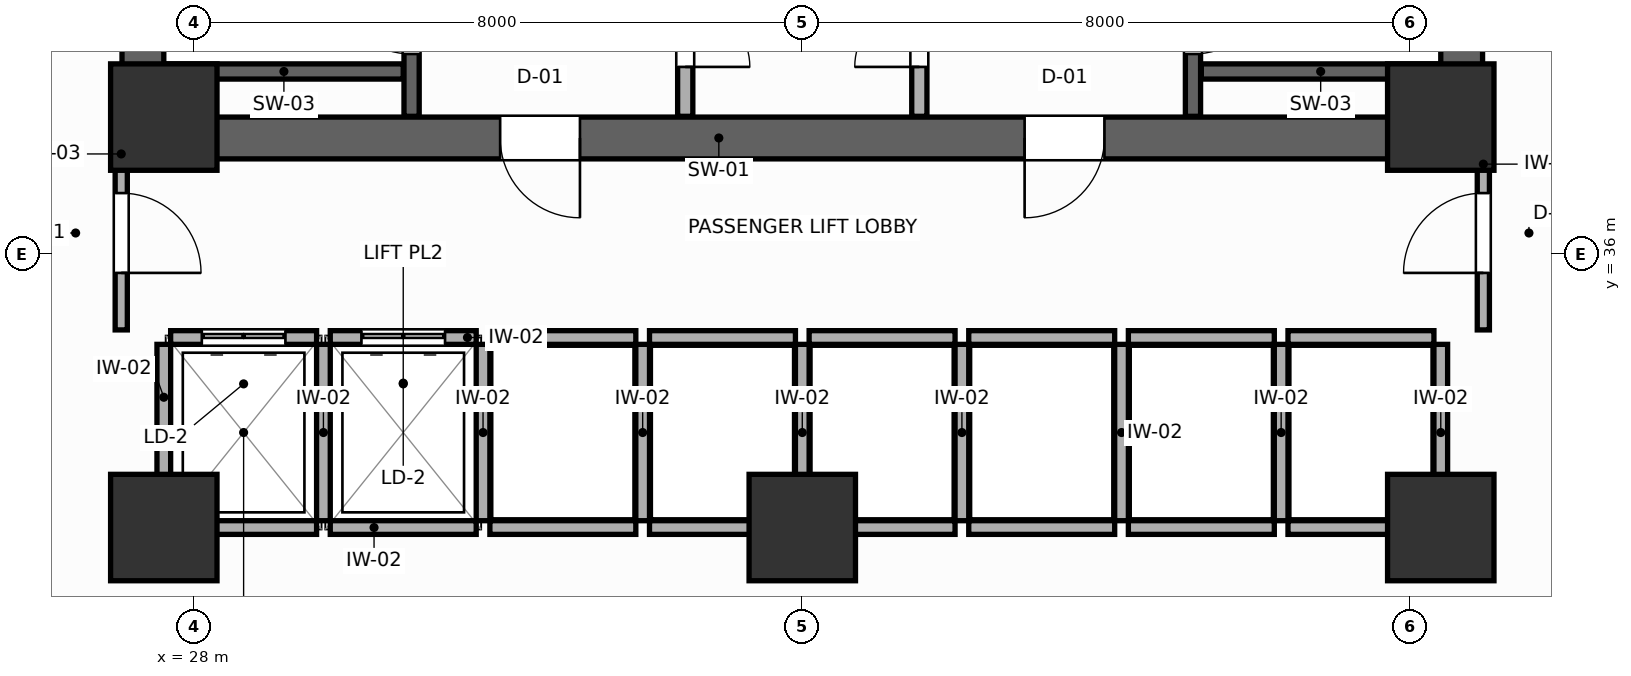
"""IFC4 building model, lengths in metres.
Left out: names, types, materials, properties, quantities, classifications, styles, units other than length and angle.
Written with IfcOpenShell. Run it as: python <this file> out.ifc"""

import sys

from ifc_helpers import new_model, si_unit, direction, frame, frame_2d, origin, origin_2d, place, context, subcontext, project, spatial, rectangle, extrude, source, transform, mapped, element, fill, save


model = new_model("IFC4")
c1 = context("Model", 3, precision=1e-05, world=origin(), true_north=direction((0.0, 1.0)))
c2 = subcontext(c1, "Body", "Model", "MODEL_VIEW")
j1 = project(units=[si_unit("LENGTHUNIT", "METRE"), si_unit("PLANEANGLEUNIT", "RADIAN")], contexts=[c1])
p1 = place(None, origin())
s1 = spatial("IfcSite", under=j1, at=p1, CompositionType="ELEMENT")
p2 = place(p1, origin())
s2 = spatial("IfcBuilding", under=s1, at=p2, CompositionType="ELEMENT")
p3 = place(p2, frame((0.0, 0.0, 91.2)))
s3 = spatial("IfcBuildingStorey", under=s2, at=p3, CompositionType="ELEMENT", Elevation=91.2)
p4 = place(p3, frame((27.05, 37.525, 0.0), z_axis=(0.0, 0.0, 1.0), x_axis=(1.0, 0.0, 0.0)))
e1 = element("IfcWall", 1, at=p4, inside=s3, PredefinedType="SHEAR", context=c2, shape_type="SweptSolid", body=[
    extrude(rectangle(XDim=17.9, YDim=0.55, at=frame_2d((8.95, 0.0))), origin(), (0.0, 0.0, 1.0), 3.9),
])
p5 = place(p4, frame((4.975, 0.0, 0.0)))
e2 = element("IfcOpeningElement", 2, at=p5, cuts=e1, PredefinedType="OPENING", context=c2, shape_type="SweptSolid", body=[
    extrude(rectangle(XDim=1.05, YDim=2.1, at=frame_2d((0.525, 1.05))), frame((0.0, 0.285, 0.0), z_axis=(0.0, -1.0, 0.0), x_axis=(1.0, 0.0, 0.0)), (0.0, 0.0, 1.0), 0.57),
])
p6 = place(p4, frame((11.875, 0.0, 0.0)))
e3 = element("IfcOpeningElement", 3, at=p6, cuts=e1, PredefinedType="OPENING", context=c2, shape_type="SweptSolid", body=[
    extrude(rectangle(XDim=1.05, YDim=2.1, at=frame_2d((0.525, 1.05))), frame((0.0, 0.285, 0.0), z_axis=(0.0, -1.0, 0.0), x_axis=(1.0, 0.0, 0.0)), (0.0, 0.0, 1.0), 0.57),
])
for number, where, z_axis, x_axis in (
    (4, (27.325, 37.8, 0.0), (0.0, 0.0, 1.0), (0.0, 1.0, 0.0)),
    (5, (44.675, 37.8, 0.0), (0.0, 0.0, 1.0), (0.0, 1.0, 0.0)),
):
    element("IfcWall", number, at=place(p3, frame(where, z_axis=z_axis, x_axis=x_axis)), inside=s3, PredefinedType="SHEAR", context=c2, shape_type="SweptSolid", body=[
        extrude(rectangle(XDim=9.0, YDim=0.55, at=frame_2d((4.5, 0.0))), origin(), (0.0, 0.0, 1.0), 3.9),
    ])
m1 = source(origin(), c2, "Body", "SweptSolid", [
    extrude(rectangle(XDim=1.4, YDim=1.4, at=origin_2d()), origin(), (0.0, 0.0, 1.0), 3.9),
])
for number, where, z_axis, x_axis in (
    (6, (27.6, 37.8, 0.0), (0.0, 0.0, 1.0), (1.0, 0.0, 0.0)),
    (7, (44.4, 37.8, 0.0), (0.0, 0.0, 1.0), (1.0, 0.0, 0.0)),
    (8, (27.6, 32.4, 0.0), (0.0, 0.0, 1.0), (1.0, 0.0, 0.0)),
    (9, (44.4, 32.4, 0.0), (0.0, 0.0, 1.0), (1.0, 0.0, 0.0)),
    (10, (36.0, 32.4, 0.0), (0.0, 0.0, 1.0), (1.0, 0.0, 0.0)),
):
    element("IfcColumn", number, at=place(p3, frame(where, z_axis=z_axis, x_axis=x_axis)), inside=s3, PredefinedType="COLUMN", context=c2, shape_type="MappedRepresentation", body=[
        mapped(m1, transform((0.0, 0.0, 0.0), scale=1.0)),
    ])
p7 = place(p3, frame((30.86, 37.81, 0.0), z_axis=(0.0, 0.0, 1.0), x_axis=(0.0, 1.0, 0.0)))
e11 = element("IfcWall", 11, at=p7, inside=s3, PredefinedType="SHEAR", context=c2, shape_type="SweptSolid", body=[
    extrude(rectangle(XDim=8.98, YDim=0.2, at=frame_2d((4.49, 0.0))), origin(), (0.0, 0.0, 1.0), 3.9),
])
p8 = place(p7, frame((0.82, 0.0, 0.0)))
e12 = element("IfcOpeningElement", 12, at=p8, cuts=e11, PredefinedType="OPENING", context=c2, shape_type="SweptSolid", body=[
    extrude(rectangle(XDim=1.05, YDim=2.1, at=frame_2d((0.525, 1.05))), frame((0.0, 0.11, 0.0), z_axis=(0.0, -1.0, 0.0), x_axis=(1.0, 0.0, 0.0)), (0.0, 0.0, 1.0), 0.22),
])
p9 = place(p3, frame((27.61, 38.4, 0.0), z_axis=(0.0, 0.0, 1.0), x_axis=(1.0, 0.0, 0.0)))
e13 = element("IfcWall", 13, at=p9, inside=s3, PredefinedType="SHEAR", context=c2, shape_type="SweptSolid", body=[
    extrude(rectangle(XDim=3.14, YDim=0.2, at=frame_2d((1.57, 0.0))), origin(), (0.0, 0.0, 1.0), 3.9),
])
p10 = place(p3, frame((41.14, 37.81, 0.0), z_axis=(0.0, 0.0, 1.0), x_axis=(0.0, 1.0, 0.0)))
e14 = element("IfcWall", 14, at=p10, inside=s3, PredefinedType="SHEAR", context=c2, shape_type="SweptSolid", body=[
    extrude(rectangle(XDim=8.98, YDim=0.2, at=frame_2d((4.49, 0.0))), origin(), (0.0, 0.0, 1.0), 3.9),
])
p11 = place(p10, frame((0.82, 0.0, 0.0)))
e15 = element("IfcOpeningElement", 15, at=p11, cuts=e14, PredefinedType="OPENING", context=c2, shape_type="SweptSolid", body=[
    extrude(rectangle(XDim=1.05, YDim=2.1, at=frame_2d((0.525, 1.05))), frame((0.0, 0.11, 0.0), z_axis=(0.0, -1.0, 0.0), x_axis=(1.0, 0.0, 0.0)), (0.0, 0.0, 1.0), 0.22),
])
p12 = place(p3, frame((41.25, 38.4, 0.0), z_axis=(0.0, 0.0, 1.0), x_axis=(1.0, 0.0, 0.0)))
e16 = element("IfcWall", 16, at=p12, inside=s3, PredefinedType="SHEAR", context=c2, shape_type="SweptSolid", body=[
    extrude(rectangle(XDim=3.14, YDim=0.2, at=frame_2d((1.57, 0.0))), origin(), (0.0, 0.0, 1.0), 3.9),
])
p13 = place(p3, frame((34.46, 37.81, 0.0), z_axis=(0.0, 0.0, 1.0), x_axis=(0.0, 1.0, 0.0)))
e17 = element("IfcWall", 17, at=p13, inside=s3, PredefinedType="PARTITIONING", context=c2, shape_type="SweptSolid", body=[
    extrude(rectangle(XDim=8.98, YDim=0.2, at=frame_2d((4.49, 0.0))), origin(), (0.0, 0.0, 1.0), 3.68),
])
p14 = place(p13, frame((0.65, 0.0, 0.0)))
e18 = element("IfcOpeningElement", 18, at=p14, cuts=e17, PredefinedType="OPENING", context=c2, shape_type="SweptSolid", body=[
    extrude(rectangle(XDim=0.85, YDim=2.05, at=frame_2d((0.425, 1.025))), frame((0.0, 0.11, 0.0), z_axis=(0.0, -1.0, 0.0), x_axis=(1.0, 0.0, 0.0)), (0.0, 0.0, 1.0), 0.22),
])
p15 = place(p3, frame((37.54, 37.81, 0.0), z_axis=(0.0, 0.0, 1.0), x_axis=(0.0, 1.0, 0.0)))
e19 = element("IfcWall", 19, at=p15, inside=s3, PredefinedType="PARTITIONING", context=c2, shape_type="SweptSolid", body=[
    extrude(rectangle(XDim=8.98, YDim=0.2, at=frame_2d((4.49, 0.0))), origin(), (0.0, 0.0, 1.0), 3.68),
])
p16 = place(p15, frame((0.65, 0.0, 0.0)))
e20 = element("IfcOpeningElement", 20, at=p16, cuts=e19, PredefinedType="OPENING", context=c2, shape_type="SweptSolid", body=[
    extrude(rectangle(XDim=0.85, YDim=2.05, at=frame_2d((0.425, 1.025))), frame((0.0, 0.11, 0.0), z_axis=(0.0, -1.0, 0.0), x_axis=(1.0, 0.0, 0.0)), (0.0, 0.0, 1.0), 0.22),
])
p17 = place(p3, frame((27.69, 34.9, 0.0), z_axis=(0.0, 0.0, 1.0), x_axis=(1.0, 0.0, 0.0)))
e21 = element("IfcWall", 21, at=p17, inside=s3, PredefinedType="PARTITIONING", context=c2, shape_type="SweptSolid", body=[
    extrude(rectangle(XDim=1.92, YDim=0.18, at=frame_2d((0.96, 0.0))), origin(), (0.0, 0.0, 1.0), 3.68),
])
p18 = place(p17, frame((0.41, 0.0, 0.0)))
e22 = element("IfcOpeningElement", 22, at=p18, cuts=e21, PredefinedType="OPENING", context=c2, shape_type="SweptSolid", body=[
    extrude(rectangle(XDim=1.1, YDim=2.1, at=frame_2d((0.55, 1.05))), frame((0.0, 0.1, 0.0), z_axis=(0.0, -1.0, 0.0), x_axis=(1.0, 0.0, 0.0)), (0.0, 0.0, 1.0), 0.2),
])
p19 = place(p3, frame((27.69, 32.4, 0.0), z_axis=(0.0, 0.0, 1.0), x_axis=(1.0, 0.0, 0.0)))
e23 = element("IfcWall", 23, at=p19, inside=s3, PredefinedType="PARTITIONING", context=c2, shape_type="SweptSolid", body=[
    extrude(rectangle(XDim=1.92, YDim=0.18, at=frame_2d((0.96, 0.0))), origin(), (0.0, 0.0, 1.0), 3.18),
])
p20 = place(p3, frame((27.6, 32.49, 0.0), z_axis=(0.0, 0.0, 1.0), x_axis=(0.0, 1.0, 0.0)))
e24 = element("IfcWall", 24, at=p20, inside=s3, PredefinedType="PARTITIONING", context=c2, shape_type="SweptSolid", body=[
    extrude(rectangle(XDim=2.32, YDim=0.18, at=frame_2d((1.16, 0.0))), origin(), (0.0, 0.0, 1.0), 3.68),
])
p21 = place(p3, frame((29.79, 34.9, 0.0), z_axis=(0.0, 0.0, 1.0), x_axis=(1.0, 0.0, 0.0)))
e25 = element("IfcWall", 25, at=p21, inside=s3, PredefinedType="PARTITIONING", context=c2, shape_type="SweptSolid", body=[
    extrude(rectangle(XDim=1.92, YDim=0.18, at=frame_2d((0.96, 0.0))), origin(), (0.0, 0.0, 1.0), 3.68),
])
p22 = place(p21, frame((0.41, 0.0, 0.0)))
e26 = element("IfcOpeningElement", 26, at=p22, cuts=e25, PredefinedType="OPENING", context=c2, shape_type="SweptSolid", body=[
    extrude(rectangle(XDim=1.1, YDim=2.1, at=frame_2d((0.55, 1.05))), frame((0.0, 0.1, 0.0), z_axis=(0.0, -1.0, 0.0), x_axis=(1.0, 0.0, 0.0)), (0.0, 0.0, 1.0), 0.2),
])
p23 = place(p3, frame((29.79, 32.4, 0.0), z_axis=(0.0, 0.0, 1.0), x_axis=(1.0, 0.0, 0.0)))
e27 = element("IfcWall", 27, at=p23, inside=s3, PredefinedType="PARTITIONING", context=c2, shape_type="SweptSolid", body=[
    extrude(rectangle(XDim=1.92, YDim=0.18, at=frame_2d((0.96, 0.0))), origin(), (0.0, 0.0, 1.0), 3.18),
])
p24 = place(p3, frame((29.7, 32.49, 0.0), z_axis=(0.0, 0.0, 1.0), x_axis=(0.0, 1.0, 0.0)))
e28 = element("IfcWall", 28, at=p24, inside=s3, PredefinedType="PARTITIONING", context=c2, shape_type="SweptSolid", body=[
    extrude(rectangle(XDim=2.32, YDim=0.18, at=frame_2d((1.16, 0.0))), origin(), (0.0, 0.0, 1.0), 3.68),
])
p25 = place(p3, frame((31.89, 34.9, 0.0), z_axis=(0.0, 0.0, 1.0), x_axis=(1.0, 0.0, 0.0)))
e29 = element("IfcWall", 29, at=p25, inside=s3, PredefinedType="PARTITIONING", context=c2, shape_type="SweptSolid", body=[
    extrude(rectangle(XDim=1.92, YDim=0.18, at=frame_2d((0.96, 0.0))), origin(), (0.0, 0.0, 1.0), 3.68),
])
p26 = place(p3, frame((31.89, 32.4, 0.0), z_axis=(0.0, 0.0, 1.0), x_axis=(1.0, 0.0, 0.0)))
e30 = element("IfcWall", 30, at=p26, inside=s3, PredefinedType="PARTITIONING", context=c2, shape_type="SweptSolid", body=[
    extrude(rectangle(XDim=1.92, YDim=0.18, at=frame_2d((0.96, 0.0))), origin(), (0.0, 0.0, 1.0), 3.18),
])
p27 = place(p3, frame((31.8, 32.49, 0.0), z_axis=(0.0, 0.0, 1.0), x_axis=(0.0, 1.0, 0.0)))
e31 = element("IfcWall", 31, at=p27, inside=s3, PredefinedType="PARTITIONING", context=c2, shape_type="SweptSolid", body=[
    extrude(rectangle(XDim=2.32, YDim=0.18, at=frame_2d((1.16, 0.0))), origin(), (0.0, 0.0, 1.0), 3.68),
])
p28 = place(p3, frame((33.99, 34.9, 0.0), z_axis=(0.0, 0.0, 1.0), x_axis=(1.0, 0.0, 0.0)))
e32 = element("IfcWall", 32, at=p28, inside=s3, PredefinedType="PARTITIONING", context=c2, shape_type="SweptSolid", body=[
    extrude(rectangle(XDim=1.92, YDim=0.18, at=frame_2d((0.96, 0.0))), origin(), (0.0, 0.0, 1.0), 3.68),
])
p29 = place(p3, frame((33.99, 32.4, 0.0), z_axis=(0.0, 0.0, 1.0), x_axis=(1.0, 0.0, 0.0)))
e33 = element("IfcWall", 33, at=p29, inside=s3, PredefinedType="PARTITIONING", context=c2, shape_type="SweptSolid", body=[
    extrude(rectangle(XDim=1.92, YDim=0.18, at=frame_2d((0.96, 0.0))), origin(), (0.0, 0.0, 1.0), 3.18),
])
p30 = place(p3, frame((33.9, 32.49, 0.0), z_axis=(0.0, 0.0, 1.0), x_axis=(0.0, 1.0, 0.0)))
e34 = element("IfcWall", 34, at=p30, inside=s3, PredefinedType="PARTITIONING", context=c2, shape_type="SweptSolid", body=[
    extrude(rectangle(XDim=2.32, YDim=0.18, at=frame_2d((1.16, 0.0))), origin(), (0.0, 0.0, 1.0), 3.68),
])
p31 = place(p3, frame((36.09, 34.9, 0.0), z_axis=(0.0, 0.0, 1.0), x_axis=(1.0, 0.0, 0.0)))
e35 = element("IfcWall", 35, at=p31, inside=s3, PredefinedType="PARTITIONING", context=c2, shape_type="SweptSolid", body=[
    extrude(rectangle(XDim=1.92, YDim=0.18, at=frame_2d((0.96, 0.0))), origin(), (0.0, 0.0, 1.0), 3.68),
])
p32 = place(p3, frame((36.09, 32.4, 0.0), z_axis=(0.0, 0.0, 1.0), x_axis=(1.0, 0.0, 0.0)))
e36 = element("IfcWall", 36, at=p32, inside=s3, PredefinedType="PARTITIONING", context=c2, shape_type="SweptSolid", body=[
    extrude(rectangle(XDim=1.92, YDim=0.18, at=frame_2d((0.96, 0.0))), origin(), (0.0, 0.0, 1.0), 3.18),
])
p33 = place(p3, frame((36.0, 32.49, 0.0), z_axis=(0.0, 0.0, 1.0), x_axis=(0.0, 1.0, 0.0)))
e37 = element("IfcWall", 37, at=p33, inside=s3, PredefinedType="PARTITIONING", context=c2, shape_type="SweptSolid", body=[
    extrude(rectangle(XDim=2.32, YDim=0.18, at=frame_2d((1.16, 0.0))), origin(), (0.0, 0.0, 1.0), 3.68),
])
p34 = place(p3, frame((38.19, 34.9, 0.0), z_axis=(0.0, 0.0, 1.0), x_axis=(1.0, 0.0, 0.0)))
e38 = element("IfcWall", 38, at=p34, inside=s3, PredefinedType="PARTITIONING", context=c2, shape_type="SweptSolid", body=[
    extrude(rectangle(XDim=1.92, YDim=0.18, at=frame_2d((0.96, 0.0))), origin(), (0.0, 0.0, 1.0), 3.68),
])
p35 = place(p3, frame((38.19, 32.4, 0.0), z_axis=(0.0, 0.0, 1.0), x_axis=(1.0, 0.0, 0.0)))
e39 = element("IfcWall", 39, at=p35, inside=s3, PredefinedType="PARTITIONING", context=c2, shape_type="SweptSolid", body=[
    extrude(rectangle(XDim=1.92, YDim=0.18, at=frame_2d((0.96, 0.0))), origin(), (0.0, 0.0, 1.0), 3.18),
])
p36 = place(p3, frame((38.1, 32.49, 0.0), z_axis=(0.0, 0.0, 1.0), x_axis=(0.0, 1.0, 0.0)))
e40 = element("IfcWall", 40, at=p36, inside=s3, PredefinedType="PARTITIONING", context=c2, shape_type="SweptSolid", body=[
    extrude(rectangle(XDim=2.32, YDim=0.18, at=frame_2d((1.16, 0.0))), origin(), (0.0, 0.0, 1.0), 3.68),
])
p37 = place(p3, frame((40.29, 34.9, 0.0), z_axis=(0.0, 0.0, 1.0), x_axis=(1.0, 0.0, 0.0)))
e41 = element("IfcWall", 41, at=p37, inside=s3, PredefinedType="PARTITIONING", context=c2, shape_type="SweptSolid", body=[
    extrude(rectangle(XDim=1.92, YDim=0.18, at=frame_2d((0.96, 0.0))), origin(), (0.0, 0.0, 1.0), 3.68),
])
p38 = place(p3, frame((40.29, 32.4, 0.0), z_axis=(0.0, 0.0, 1.0), x_axis=(1.0, 0.0, 0.0)))
e42 = element("IfcWall", 42, at=p38, inside=s3, PredefinedType="PARTITIONING", context=c2, shape_type="SweptSolid", body=[
    extrude(rectangle(XDim=1.92, YDim=0.18, at=frame_2d((0.96, 0.0))), origin(), (0.0, 0.0, 1.0), 3.18),
])
p39 = place(p3, frame((40.2, 32.49, 0.0), z_axis=(0.0, 0.0, 1.0), x_axis=(0.0, 1.0, 0.0)))
e43 = element("IfcWall", 43, at=p39, inside=s3, PredefinedType="PARTITIONING", context=c2, shape_type="SweptSolid", body=[
    extrude(rectangle(XDim=2.32, YDim=0.18, at=frame_2d((1.16, 0.0))), origin(), (0.0, 0.0, 1.0), 3.68),
])
p40 = place(p3, frame((42.39, 34.9, 0.0), z_axis=(0.0, 0.0, 1.0), x_axis=(1.0, 0.0, 0.0)))
e44 = element("IfcWall", 44, at=p40, inside=s3, PredefinedType="PARTITIONING", context=c2, shape_type="SweptSolid", body=[
    extrude(rectangle(XDim=1.92, YDim=0.18, at=frame_2d((0.96, 0.0))), origin(), (0.0, 0.0, 1.0), 3.68),
])
p41 = place(p3, frame((42.39, 32.4, 0.0), z_axis=(0.0, 0.0, 1.0), x_axis=(1.0, 0.0, 0.0)))
e45 = element("IfcWall", 45, at=p41, inside=s3, PredefinedType="PARTITIONING", context=c2, shape_type="SweptSolid", body=[
    extrude(rectangle(XDim=1.92, YDim=0.18, at=frame_2d((0.96, 0.0))), origin(), (0.0, 0.0, 1.0), 3.18),
])
for number, where, z_axis, x_axis in (
    (46, (42.3, 32.49, 0.0), (0.0, 0.0, 1.0), (0.0, 1.0, 0.0)),
    (47, (44.4, 32.49, 0.0), (0.0, 0.0, 1.0), (0.0, 1.0, 0.0)),
):
    element("IfcWall", number, at=place(p3, frame(where, z_axis=z_axis, x_axis=x_axis)), inside=s3, PredefinedType="PARTITIONING", context=c2, shape_type="SweptSolid", body=[
        extrude(rectangle(XDim=2.32, YDim=0.18, at=frame_2d((1.16, 0.0))), origin(), (0.0, 0.0, 1.0), 3.68),
    ])
p42 = place(p3, frame((27.04, 35.0, 0.0), z_axis=(0.0, 0.0, 1.0), x_axis=(0.0, 1.0, 0.0)))
e48 = element("IfcWall", 48, at=p42, inside=s3, PredefinedType="PARTITIONING", context=c2, shape_type="SweptSolid", body=[
    extrude(rectangle(XDim=2.65, YDim=0.16, at=frame_2d((1.325, 0.0))), origin(), (0.0, 0.0, 1.0), 3.68),
])
p43 = place(p42, frame((0.75, 0.0, 0.0)))
e49 = element("IfcOpeningElement", 49, at=p43, cuts=e48, PredefinedType="OPENING", context=c2, shape_type="SweptSolid", body=[
    extrude(rectangle(XDim=1.05, YDim=2.1, at=frame_2d((0.525, 1.05))), frame((0.0, 0.09, 0.0), z_axis=(0.0, -1.0, 0.0), x_axis=(1.0, 0.0, 0.0)), (0.0, 0.0, 1.0), 0.18),
])
p44 = place(p3, frame((44.96, 35.0, 0.0), z_axis=(0.0, 0.0, 1.0), x_axis=(0.0, 1.0, 0.0)))
e50 = element("IfcWall", 50, at=p44, inside=s3, PredefinedType="PARTITIONING", context=c2, shape_type="SweptSolid", body=[
    extrude(rectangle(XDim=2.65, YDim=0.16, at=frame_2d((1.325, 0.0))), origin(), (0.0, 0.0, 1.0), 3.68),
])
p45 = place(p44, frame((0.75, 0.0, 0.0)))
e51 = element("IfcOpeningElement", 51, at=p45, cuts=e50, PredefinedType="OPENING", context=c2, shape_type="SweptSolid", body=[
    extrude(rectangle(XDim=1.05, YDim=2.1, at=frame_2d((0.525, 1.05))), frame((0.0, 0.09, 0.0), z_axis=(0.0, -1.0, 0.0), x_axis=(1.0, 0.0, 0.0)), (0.0, 0.0, 1.0), 0.18),
])
p46 = place(p8, origin())
e52 = element("IfcDoor", 52, at=p46, inside=s3, OperationType="SINGLE_SWING_RIGHT", PredefinedType="DOOR", context=c2, shape_type="SweptSolid", body=[
    extrude(rectangle(XDim=1.05, YDim=2.1, at=frame_2d((0.525, 1.05))), frame((0.0, 0.025, 0.0), z_axis=(0.0, -1.0, 0.0), x_axis=(1.0, 0.0, 0.0)), (0.0, 0.0, 1.0), 0.05),
])
fill(e12, e52)
p47 = place(p11, frame((1.05, 0.0, 0.0), z_axis=(0.0, 0.0, 1.0), x_axis=(-1.0, 0.0, 0.0)))
e53 = element("IfcDoor", 53, at=p47, inside=s3, OperationType="SINGLE_SWING_LEFT", PredefinedType="DOOR", context=c2, shape_type="SweptSolid", body=[
    extrude(rectangle(XDim=1.05, YDim=2.1, at=frame_2d((0.525, 1.05))), frame((0.0, 0.025, 0.0), z_axis=(0.0, -1.0, 0.0), x_axis=(1.0, 0.0, 0.0)), (0.0, 0.0, 1.0), 0.05),
])
fill(e15, e53)
p48 = place(p14, frame((0.85, 0.0, 0.0), z_axis=(0.0, 0.0, 1.0), x_axis=(-1.0, 0.0, 0.0)))
e54 = element("IfcDoor", 54, at=p48, inside=s3, OperationType="SINGLE_SWING_RIGHT", PredefinedType="DOOR", context=c2, shape_type="SweptSolid", body=[
    extrude(rectangle(XDim=0.85, YDim=2.05, at=frame_2d((0.425, 1.025))), frame((0.0, 0.025, 0.0), z_axis=(0.0, -1.0, 0.0), x_axis=(1.0, 0.0, 0.0)), (0.0, 0.0, 1.0), 0.05),
])
fill(e18, e54)
p49 = place(p16, origin())
e55 = element("IfcDoor", 55, at=p49, inside=s3, OperationType="SINGLE_SWING_LEFT", PredefinedType="DOOR", context=c2, shape_type="SweptSolid", body=[
    extrude(rectangle(XDim=0.85, YDim=2.05, at=frame_2d((0.425, 1.025))), frame((0.0, 0.025, 0.0), z_axis=(0.0, -1.0, 0.0), x_axis=(1.0, 0.0, 0.0)), (0.0, 0.0, 1.0), 0.05),
])
fill(e20, e55)
p50 = place(p18, origin())
e56 = element("IfcDoor", 56, at=p50, inside=s3, OperationType="DOUBLE_DOOR_SLIDING", PredefinedType="DOOR", context=c2, shape_type="SweptSolid", body=[
    extrude(rectangle(XDim=1.1, YDim=2.1, at=frame_2d((0.55, 1.05))), frame((0.0, 0.025, 0.0), z_axis=(0.0, -1.0, 0.0), x_axis=(1.0, 0.0, 0.0)), (0.0, 0.0, 1.0), 0.05),
])
fill(e22, e56)
p51 = place(p22, origin())
e57 = element("IfcDoor", 57, at=p51, inside=s3, OperationType="DOUBLE_DOOR_SLIDING", PredefinedType="DOOR", context=c2, shape_type="SweptSolid", body=[
    extrude(rectangle(XDim=1.1, YDim=2.1, at=frame_2d((0.55, 1.05))), frame((0.0, 0.025, 0.0), z_axis=(0.0, -1.0, 0.0), x_axis=(1.0, 0.0, 0.0)), (0.0, 0.0, 1.0), 0.05),
])
fill(e26, e57)
p52 = place(p43, frame((1.05, 0.0, 0.0), z_axis=(0.0, 0.0, 1.0), x_axis=(-1.0, 0.0, 0.0)))
e58 = element("IfcDoor", 58, at=p52, inside=s3, OperationType="SINGLE_SWING_RIGHT", PredefinedType="DOOR", context=c2, shape_type="SweptSolid", body=[
    extrude(rectangle(XDim=1.05, YDim=2.1, at=frame_2d((0.525, 1.05))), frame((0.0, 0.025, 0.0), z_axis=(0.0, -1.0, 0.0), x_axis=(1.0, 0.0, 0.0)), (0.0, 0.0, 1.0), 0.05),
])
fill(e49, e58)
p53 = place(p45, origin())
e59 = element("IfcDoor", 59, at=p53, inside=s3, OperationType="SINGLE_SWING_LEFT", PredefinedType="DOOR", context=c2, shape_type="SweptSolid", body=[
    extrude(rectangle(XDim=1.05, YDim=2.1, at=frame_2d((0.525, 1.05))), frame((0.0, 0.025, 0.0), z_axis=(0.0, -1.0, 0.0), x_axis=(1.0, 0.0, 0.0)), (0.0, 0.0, 1.0), 0.05),
])
fill(e51, e59)
p54 = place(p5, frame((1.05, 0.0, 0.0), z_axis=(0.0, 0.0, 1.0), x_axis=(-1.0, 0.0, 0.0)))
e60 = element("IfcDoor", 60, at=p54, inside=s3, OperationType="SINGLE_SWING_LEFT", PredefinedType="DOOR", context=c2, shape_type="SweptSolid", body=[
    extrude(rectangle(XDim=1.05, YDim=2.1, at=frame_2d((0.525, 1.05))), frame((0.0, 0.025, 0.0), z_axis=(0.0, -1.0, 0.0), x_axis=(1.0, 0.0, 0.0)), (0.0, 0.0, 1.0), 0.05),
])
fill(e2, e60)
p55 = place(p6, frame((1.05, 0.0, 0.0), z_axis=(0.0, 0.0, 1.0), x_axis=(-1.0, 0.0, 0.0)))
e61 = element("IfcDoor", 61, at=p55, inside=s3, OperationType="SINGLE_SWING_RIGHT", PredefinedType="DOOR", context=c2, shape_type="SweptSolid", body=[
    extrude(rectangle(XDim=1.05, YDim=2.1, at=frame_2d((0.525, 1.05))), frame((0.0, 0.025, 0.0), z_axis=(0.0, -1.0, 0.0), x_axis=(1.0, 0.0, 0.0)), (0.0, 0.0, 1.0), 0.05),
])
fill(e3, e61)
save(model, sys.argv[1])
